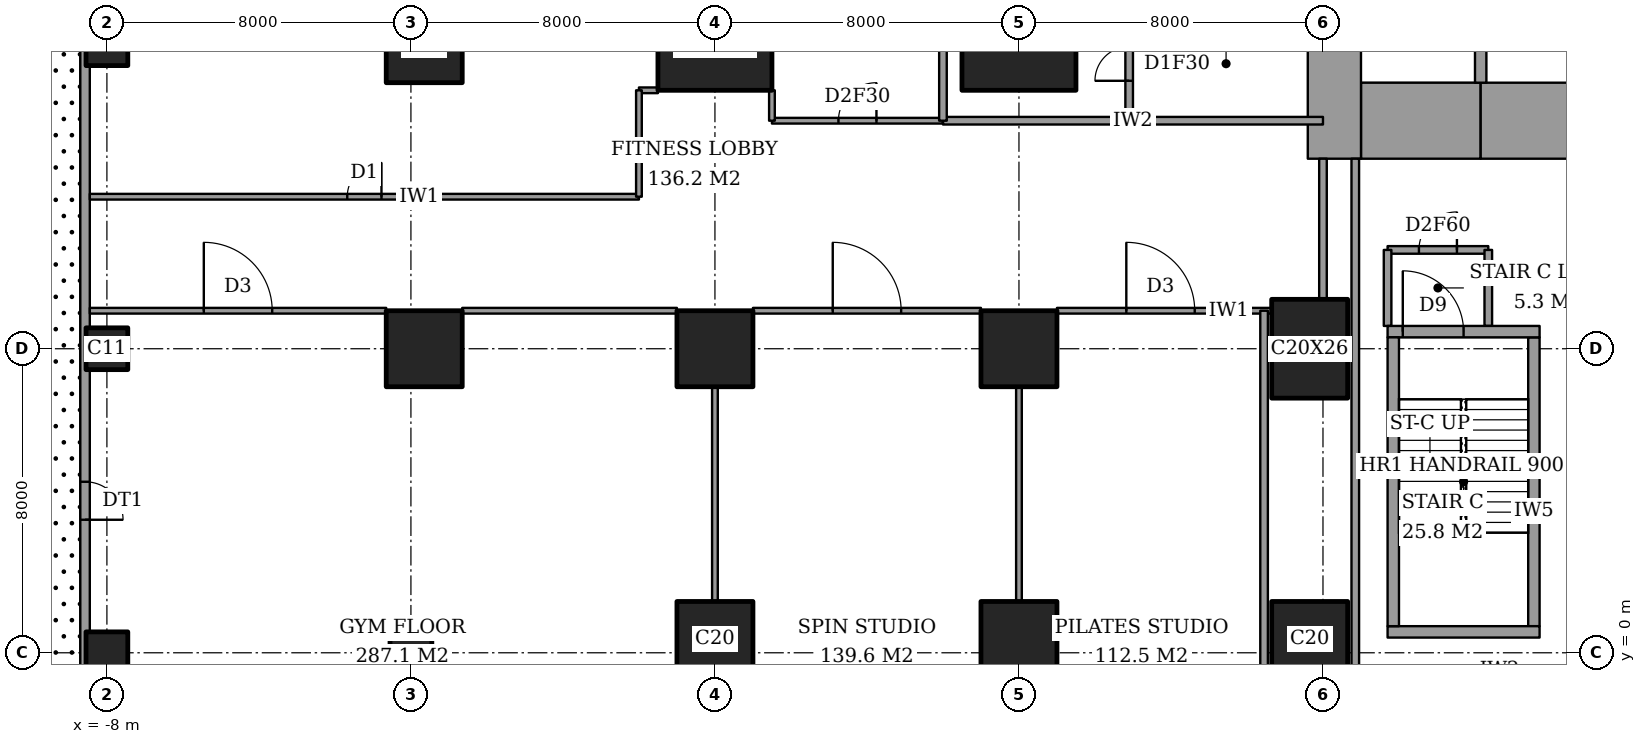
"""IFC4 building model, lengths in metres.
Left out: names, types, materials, properties, quantities, classifications, styles, units other than length and angle.
Written with IfcOpenShell. Run it as: python <this file> out.ifc"""

import sys

from ifc_helpers import new_model, si_unit, direction, frame, frame_2d, origin, origin_2d, place, context, subcontext, project, spatial, rectangle, extrude, element, fill, save


model = new_model("IFC4")
c1 = context("Model", 3, precision=1e-05, world=origin(), true_north=direction((0.0, 1.0)))
c2 = subcontext(c1, "Body", "Model", "MODEL_VIEW")
j1 = project(units=[si_unit("LENGTHUNIT", "METRE"), si_unit("PLANEANGLEUNIT", "RADIAN")], contexts=[c1])
p1 = place(None, origin())
s1 = spatial("IfcSite", under=j1, at=p1, CompositionType="ELEMENT")
p2 = place(p1, origin())
s2 = spatial("IfcBuilding", under=s1, at=p2, CompositionType="ELEMENT")
p3 = place(p2, frame((0.0, 0.0, 11.0)))
s3 = spatial("IfcBuildingStorey", under=s2, at=p3, CompositionType="ELEMENT", Elevation=11.0)
for number, where, z_axis, x_axis in (
    (1, (-8.0, 0.0, 0.0), (0.0, 0.0, 1.0), (1.0, 0.0, 0.0)),
    (2, (-8.0, 8.0, 0.0), (0.0, 0.0, 1.0), (1.0, 0.0, 0.0)),
    (3, (-8.0, 16.0, 0.0), (0.0, 0.0, 1.0), (1.0, 0.0, 0.0)),
    (4, (0.0, 0.0, 0.0), (0.0, 0.0, 1.0), (1.0, 0.0, 0.0)),
):
    element("IfcColumn", number, at=place(p3, frame(where, z_axis=z_axis, x_axis=x_axis)), inside=s3, PredefinedType="COLUMN", context=c2, shape_type="SweptSolid", body=[
        extrude(rectangle(XDim=1.1, YDim=1.1, at=origin_2d()), origin(), (0.0, 0.0, 1.0), 5.0),
    ])
for number, where, z_axis, x_axis in (
    (5, (0.35, 8.0, 0.0), (0.0, 0.0, 1.0), (1.0, 0.0, 0.0)),
    (6, (0.35, 16.0, 0.0), (0.0, 0.0, 1.0), (1.0, 0.0, 0.0)),
    (7, (8.0, 0.35, 0.0), (0.0, 0.0, 1.0), (1.0, 0.0, 0.0)),
    (8, (8.0, 8.0, 0.0), (0.0, 0.0, 1.0), (1.0, 0.0, 0.0)),
):
    element("IfcColumn", number, at=place(p3, frame(where, z_axis=z_axis, x_axis=x_axis)), inside=s3, PredefinedType="COLUMN", context=c2, shape_type="SweptSolid", body=[
        extrude(rectangle(XDim=2.0, YDim=2.0, at=origin_2d()), origin(), (0.0, 0.0, 1.0), 5.0),
    ])
p4 = place(p3, frame((8.0, 16.0, 0.0), z_axis=(0.0, 0.0, 1.0), x_axis=(1.0, 0.0, 0.0)))
e9 = element("IfcColumn", 9, at=p4, inside=s3, PredefinedType="COLUMN", context=c2, shape_type="SweptSolid", body=[
    extrude(rectangle(XDim=3.0, YDim=2.4, at=origin_2d()), origin(), (0.0, 0.0, 1.0), 5.0),
])
for number, where, z_axis, x_axis in (
    (10, (16.0, 0.35, 0.0), (0.0, 0.0, 1.0), (1.0, 0.0, 0.0)),
    (11, (16.0, 8.0, 0.0), (0.0, 0.0, 1.0), (1.0, 0.0, 0.0)),
):
    element("IfcColumn", number, at=place(p3, frame(where, z_axis=z_axis, x_axis=x_axis)), inside=s3, PredefinedType="COLUMN", context=c2, shape_type="SweptSolid", body=[
        extrude(rectangle(XDim=2.0, YDim=2.0, at=origin_2d()), origin(), (0.0, 0.0, 1.0), 5.0),
    ])
p5 = place(p3, frame((16.0, 16.0, 0.0), z_axis=(0.0, 0.0, 1.0), x_axis=(1.0, 0.0, 0.0)))
e12 = element("IfcColumn", 12, at=p5, inside=s3, PredefinedType="COLUMN", context=c2, shape_type="SweptSolid", body=[
    extrude(rectangle(XDim=3.0, YDim=2.4, at=origin_2d()), origin(), (0.0, 0.0, 1.0), 5.0),
])
p6 = place(p3, frame((23.65, 0.35, 0.0), z_axis=(0.0, 0.0, 1.0), x_axis=(1.0, 0.0, 0.0)))
e13 = element("IfcColumn", 13, at=p6, inside=s3, PredefinedType="COLUMN", context=c2, shape_type="SweptSolid", body=[
    extrude(rectangle(XDim=2.0, YDim=2.0, at=origin_2d()), origin(), (0.0, 0.0, 1.0), 5.0),
])
p7 = place(p3, frame((23.65, 8.0, 0.0), z_axis=(0.0, 0.0, 1.0), x_axis=(1.0, 0.0, 0.0)))
e14 = element("IfcColumn", 14, at=p7, inside=s3, PredefinedType="COLUMN", context=c2, shape_type="SweptSolid", body=[
    extrude(rectangle(XDim=2.0, YDim=2.6, at=origin_2d()), origin(), (0.0, 0.0, 1.0), 5.0),
])
p8 = place(p3, frame((25.0, 14.0, 0.0), z_axis=(0.0, 0.0, 1.0), x_axis=(1.0, 0.0, 0.0)))
e15 = element("IfcWall", 15, at=p8, inside=s3, PredefinedType="SHEAR", context=c2, shape_type="SweptSolid", body=[
    extrude(rectangle(XDim=3.15, YDim=2.0, at=frame_2d((1.575, 0.0))), origin(), (0.0, 0.0, 1.0), 5.0),
])
p9 = place(p3, frame((28.15, 14.0, 0.0), z_axis=(0.0, 0.0, 1.0), x_axis=(1.0, 0.0, 0.0)))
e16 = element("IfcWall", 16, at=p9, inside=s3, PredefinedType="SHEAR", context=c2, shape_type="SweptSolid", body=[
    extrude(rectangle(XDim=9.7, YDim=2.0, at=frame_2d((4.85, 0.0))), origin(), (0.0, 0.0, 1.0), 5.0),
])
p10 = place(p3, frame((24.3, 13.0, 0.0), z_axis=(0.0, 0.0, 1.0), x_axis=(0.0, 1.0, 0.0)))
e17 = element("IfcWall", 17, at=p10, inside=s3, PredefinedType="SHEAR", context=c2, shape_type="SweptSolid", body=[
    extrude(rectangle(XDim=10.15, YDim=1.4, at=frame_2d((5.075, 0.0))), origin(), (0.0, 0.0, 1.0), 5.0),
])
p11 = place(p3, frame((28.15, 15.0, 0.0), z_axis=(0.0, 0.0, 1.0), x_axis=(0.0, 1.0, 0.0)))
e18 = element("IfcWall", 18, at=p11, inside=s3, PredefinedType="SHEAR", context=c2, shape_type="SweptSolid", body=[
    extrude(rectangle(XDim=8.15, YDim=0.3, at=frame_2d((4.075, 0.0))), origin(), (0.0, 0.0, 1.0), 5.0),
])
p12 = place(p3, frame((-8.575, 56.575, 0.0), z_axis=(0.0, 0.0, 1.0), x_axis=(0.0, -1.0, 0.0)))
e19 = element("IfcWall", 19, at=p12, inside=s3, PredefinedType="SOLIDWALL", context=c2, shape_type="SweptSolid", body=[
    extrude(rectangle(XDim=65.15, YDim=0.25, at=frame_2d((32.575, 0.0))), origin(), (0.0, 0.0, 1.0), 5.0),
])
p13 = place(p12, frame((4.075, 0.0, 0.0)))
e20 = element("IfcOpeningElement", 20, at=p13, cuts=e19, PredefinedType="OPENING", context=c2, shape_type="SweptSolid", body=[
    extrude(rectangle(XDim=1.0, YDim=2.4, at=frame_2d((0.5, 1.2))), frame((0.0, 0.135, 0.0), z_axis=(0.0, -1.0, 0.0), x_axis=(1.0, 0.0, 0.0)), (0.0, 0.0, 1.0), 0.27),
])
p14 = place(p12, frame((20.075, 0.0, 0.0)))
e21 = element("IfcOpeningElement", 21, at=p14, cuts=e19, PredefinedType="OPENING", context=c2, shape_type="SweptSolid", body=[
    extrude(rectangle(XDim=1.0, YDim=2.4, at=frame_2d((0.5, 1.2))), frame((0.0, 0.135, 0.0), z_axis=(0.0, -1.0, 0.0), x_axis=(1.0, 0.0, 0.0)), (0.0, 0.0, 1.0), 0.27),
])
p15 = place(p12, frame((52.075, 0.0, 0.0)))
e22 = element("IfcOpeningElement", 22, at=p15, cuts=e19, PredefinedType="OPENING", context=c2, shape_type="SweptSolid", body=[
    extrude(rectangle(XDim=1.0, YDim=2.4, at=frame_2d((0.5, 1.2))), frame((0.0, 0.135, 0.0), z_axis=(0.0, -1.0, 0.0), x_axis=(1.0, 0.0, 0.0)), (0.0, 0.0, 1.0), 0.27),
])
p16 = place(p3, frame((-8.45, 9.0, 0.0), z_axis=(0.0, 0.0, 1.0), x_axis=(1.0, 0.0, 0.0)))
e23 = element("IfcWall", 23, at=p16, inside=s3, PredefinedType="PARTITIONING", context=c2, shape_type="SweptSolid", body=[
    extrude(rectangle(XDim=7.8, YDim=0.15, at=frame_2d((3.9, 0.0))), origin(), (0.0, 0.0, 1.0), 4.7),
])
p17 = place(p16, frame((3.0, 0.0, 0.0)))
e24 = element("IfcOpeningElement", 24, at=p17, cuts=e23, PredefinedType="OPENING", context=c2, shape_type="SweptSolid", body=[
    extrude(rectangle(XDim=1.8, YDim=2.1, at=frame_2d((0.9, 1.05))), frame((0.0, 0.085, 0.0), z_axis=(0.0, -1.0, 0.0), x_axis=(1.0, 0.0, 0.0)), (0.0, 0.0, 1.0), 0.17),
])
p18 = place(p3, frame((1.35, 9.0, 0.0), z_axis=(0.0, 0.0, 1.0), x_axis=(1.0, 0.0, 0.0)))
e25 = element("IfcWall", 25, at=p18, inside=s3, PredefinedType="PARTITIONING", context=c2, shape_type="SweptSolid", body=[
    extrude(rectangle(XDim=5.65, YDim=0.15, at=frame_2d((2.825, 0.0))), origin(), (0.0, 0.0, 1.0), 4.7),
])
p19 = place(p3, frame((9.0, 9.0, 0.0), z_axis=(0.0, 0.0, 1.0), x_axis=(1.0, 0.0, 0.0)))
e26 = element("IfcWall", 26, at=p19, inside=s3, PredefinedType="PARTITIONING", context=c2, shape_type="SweptSolid", body=[
    extrude(rectangle(XDim=6.0, YDim=0.15, at=frame_2d((3.0, 0.0))), origin(), (0.0, 0.0, 1.0), 4.7),
])
p20 = place(p19, frame((2.1, 0.0, 0.0)))
e27 = element("IfcOpeningElement", 27, at=p20, cuts=e26, PredefinedType="OPENING", context=c2, shape_type="SweptSolid", body=[
    extrude(rectangle(XDim=1.8, YDim=2.1, at=frame_2d((0.9, 1.05))), frame((0.0, 0.085, 0.0), z_axis=(0.0, -1.0, 0.0), x_axis=(1.0, 0.0, 0.0)), (0.0, 0.0, 1.0), 0.17),
])
p21 = place(p3, frame((17.0, 9.0, 0.0), z_axis=(0.0, 0.0, 1.0), x_axis=(1.0, 0.0, 0.0)))
e28 = element("IfcWall", 28, at=p21, inside=s3, PredefinedType="PARTITIONING", context=c2, shape_type="SweptSolid", body=[
    extrude(rectangle(XDim=5.65, YDim=0.15, at=frame_2d((2.825, 0.0))), origin(), (0.0, 0.0, 1.0), 4.7),
])
p22 = place(p21, frame((1.825, 0.0, 0.0)))
e29 = element("IfcOpeningElement", 29, at=p22, cuts=e28, PredefinedType="OPENING", context=c2, shape_type="SweptSolid", body=[
    extrude(rectangle(XDim=1.8, YDim=2.1, at=frame_2d((0.9, 1.05))), frame((0.0, 0.085, 0.0), z_axis=(0.0, -1.0, 0.0), x_axis=(1.0, 0.0, 0.0)), (0.0, 0.0, 1.0), 0.17),
])
p23 = place(p3, frame((25.7, 10.6, 0.0), z_axis=(0.0, 0.0, 1.0), x_axis=(1.0, 0.0, 0.0)))
e30 = element("IfcWall", 30, at=p23, inside=s3, PredefinedType="PARTITIONING", context=c2, shape_type="SweptSolid", body=[
    extrude(rectangle(XDim=2.65, YDim=0.2, at=frame_2d((1.325, 0.0))), origin(), (0.0, 0.0, 1.0), 4.7),
])
p24 = place(p23, frame((0.825, 0.0, 0.0)))
e31 = element("IfcOpeningElement", 31, at=p24, cuts=e30, PredefinedType="OPENING", context=c2, shape_type="SweptSolid", body=[
    extrude(rectangle(XDim=1.0, YDim=2.1, at=frame_2d((0.5, 1.05))), frame((0.0, 0.11, 0.0), z_axis=(0.0, -1.0, 0.0), x_axis=(1.0, 0.0, 0.0)), (0.0, 0.0, 1.0), 0.22),
])
p25 = place(p3, frame((-8.45, 12.0, 0.0), z_axis=(0.0, 0.0, 1.0), x_axis=(1.0, 0.0, 0.0)))
e32 = element("IfcWall", 32, at=p25, inside=s3, PredefinedType="PARTITIONING", context=c2, shape_type="SweptSolid", body=[
    extrude(rectangle(XDim=14.45, YDim=0.15, at=frame_2d((7.225, 0.0))), origin(), (0.0, 0.0, 1.0), 4.7),
])
p26 = place(p25, frame((6.775, 0.0, 0.0)))
e33 = element("IfcOpeningElement", 33, at=p26, cuts=e32, PredefinedType="OPENING", context=c2, shape_type="SweptSolid", body=[
    extrude(rectangle(XDim=0.9, YDim=2.1, at=frame_2d((0.45, 1.05))), frame((0.0, 0.085, 0.0), z_axis=(0.0, -1.0, 0.0), x_axis=(1.0, 0.0, 0.0)), (0.0, 0.0, 1.0), 0.17),
])
p27 = place(p3, frame((14.0, 14.0, 0.0), z_axis=(0.0, 0.0, 1.0), x_axis=(1.0, 0.0, 0.0)))
e34 = element("IfcWall", 34, at=p27, inside=s3, PredefinedType="PARTITIONING", context=c2, shape_type="SweptSolid", body=[
    extrude(rectangle(XDim=10.0, YDim=0.2, at=frame_2d((5.0, 0.0))), origin(), (0.0, 0.0, 1.0), 4.7),
])
p28 = place(p3, frame((9.5, 14.0, 0.0), z_axis=(0.0, 0.0, 1.0), x_axis=(1.0, 0.0, 0.0)))
e35 = element("IfcWall", 35, at=p28, inside=s3, PredefinedType="PARTITIONING", context=c2, shape_type="SweptSolid", body=[
    extrude(rectangle(XDim=4.5, YDim=0.15, at=frame_2d((2.25, 0.0))), origin(), (0.0, 0.0, 1.0), 4.7),
])
p29 = place(p28, frame((1.75, 0.0, 0.0)))
e36 = element("IfcOpeningElement", 36, at=p29, cuts=e35, PredefinedType="OPENING", context=c2, shape_type="SweptSolid", body=[
    extrude(rectangle(XDim=1.0, YDim=2.1, at=frame_2d((0.5, 1.05))), frame((0.0, 0.085, 0.0), z_axis=(0.0, -1.0, 0.0), x_axis=(1.0, 0.0, 0.0)), (0.0, 0.0, 1.0), 0.17),
])
p30 = place(p3, frame((6.0, 14.8, 0.0), z_axis=(0.0, 0.0, 1.0), x_axis=(1.0, 0.0, 0.0)))
e37 = element("IfcWall", 37, at=p30, inside=s3, PredefinedType="PARTITIONING", context=c2, shape_type="SweptSolid", body=[
    extrude(rectangle(XDim=0.5, YDim=0.15, at=frame_2d((0.25, 0.0))), origin(), (0.0, 0.0, 1.0), 4.7),
])
p31 = place(p3, frame((6.0, 12.0, 0.0), z_axis=(0.0, 0.0, 1.0), x_axis=(0.0, 1.0, 0.0)))
e38 = element("IfcWall", 38, at=p31, inside=s3, PredefinedType="PARTITIONING", context=c2, shape_type="SweptSolid", body=[
    extrude(rectangle(XDim=2.8, YDim=0.15, at=frame_2d((1.4, 0.0))), origin(), (0.0, 0.0, 1.0), 4.7),
])
p32 = place(p3, frame((8.0, 1.35, 0.0), z_axis=(0.0, 0.0, 1.0), x_axis=(0.0, 1.0, 0.0)))
e39 = element("IfcWall", 39, at=p32, inside=s3, PredefinedType="PARTITIONING", context=c2, shape_type="SweptSolid", body=[
    extrude(rectangle(XDim=5.65, YDim=0.15, at=frame_2d((2.825, 0.0))), origin(), (0.0, 0.0, 1.0), 3.3),
])
p33 = place(p3, frame((9.5, 14.0, 0.0), z_axis=(0.0, 0.0, 1.0), x_axis=(0.0, 1.0, 0.0)))
e40 = element("IfcWall", 40, at=p33, inside=s3, PredefinedType="PARTITIONING", context=c2, shape_type="SweptSolid", body=[
    extrude(rectangle(XDim=0.8, YDim=0.15, at=frame_2d((0.4, 0.0))), origin(), (0.0, 0.0, 1.0), 4.7),
])
p34 = place(p3, frame((14.0, 14.0, 0.0), z_axis=(0.0, 0.0, 1.0), x_axis=(0.0, 1.0, 0.0)))
e41 = element("IfcWall", 41, at=p34, inside=s3, PredefinedType="PARTITIONING", context=c2, shape_type="SweptSolid", body=[
    extrude(rectangle(XDim=9.0, YDim=0.2, at=frame_2d((4.5, 0.0))), origin(), (0.0, 0.0, 1.0), 4.7),
])
p35 = place(p34, frame((4.0, 0.0, 0.0)))
e42 = element("IfcOpeningElement", 42, at=p35, cuts=e41, PredefinedType="OPENING", context=c2, shape_type="SweptSolid", body=[
    extrude(rectangle(XDim=1.0, YDim=2.1, at=frame_2d((0.5, 1.05))), frame((0.0, 0.11, 0.0), z_axis=(0.0, -1.0, 0.0), x_axis=(1.0, 0.0, 0.0)), (0.0, 0.0, 1.0), 0.22),
])
p36 = place(p3, frame((16.0, 1.35, 0.0), z_axis=(0.0, 0.0, 1.0), x_axis=(0.0, 1.0, 0.0)))
e43 = element("IfcWall", 43, at=p36, inside=s3, PredefinedType="PARTITIONING", context=c2, shape_type="SweptSolid", body=[
    extrude(rectangle(XDim=5.65, YDim=0.15, at=frame_2d((2.825, 0.0))), origin(), (0.0, 0.0, 1.0), 3.3),
])
p37 = place(p3, frame((18.9, 14.0, 0.0), z_axis=(0.0, 0.0, 1.0), x_axis=(0.0, 1.0, 0.0)))
e44 = element("IfcWall", 44, at=p37, inside=s3, PredefinedType="PARTITIONING", context=c2, shape_type="SweptSolid", body=[
    extrude(rectangle(XDim=6.0, YDim=0.2, at=frame_2d((3.0, 0.0))), origin(), (0.0, 0.0, 1.0), 4.7),
])
p38 = place(p37, frame((1.05, 0.0, 0.0)))
e45 = element("IfcOpeningElement", 45, at=p38, cuts=e44, PredefinedType="OPENING", context=c2, shape_type="SweptSolid", body=[
    extrude(rectangle(XDim=0.9, YDim=2.1, at=frame_2d((0.45, 1.05))), frame((0.0, 0.11, 0.0), z_axis=(0.0, -1.0, 0.0), x_axis=(1.0, 0.0, 0.0)), (0.0, 0.0, 1.0), 0.22),
])
p39 = place(p37, frame((4.05, 0.0, 0.0)))
e46 = element("IfcOpeningElement", 46, at=p39, cuts=e44, PredefinedType="OPENING", context=c2, shape_type="SweptSolid", body=[
    extrude(rectangle(XDim=0.9, YDim=2.1, at=frame_2d((0.45, 1.05))), frame((0.0, 0.11, 0.0), z_axis=(0.0, -1.0, 0.0), x_axis=(1.0, 0.0, 0.0)), (0.0, 0.0, 1.0), 0.22),
])
p40 = place(p3, frame((22.45, -8.45, 0.0), z_axis=(0.0, 0.0, 1.0), x_axis=(0.0, 1.0, 0.0)))
e47 = element("IfcWall", 47, at=p40, inside=s3, PredefinedType="PARTITIONING", context=c2, shape_type="SweptSolid", body=[
    extrude(rectangle(XDim=17.45, YDim=0.2, at=frame_2d((8.725, 0.0))), origin(), (0.0, 0.0, 1.0), 4.7),
])
p41 = place(p3, frame((24.0, 9.3, 0.0), z_axis=(0.0, 0.0, 1.0), x_axis=(0.0, 1.0, 0.0)))
e48 = element("IfcWall", 48, at=p41, inside=s3, PredefinedType="PARTITIONING", context=c2, shape_type="SweptSolid", body=[
    extrude(rectangle(XDim=3.7, YDim=0.2, at=frame_2d((1.85, 0.0))), origin(), (0.0, 0.0, 1.0), 4.7),
])
p42 = place(p3, frame((24.85, -0.45, 0.0), z_axis=(0.0, 0.0, 1.0), x_axis=(0.0, 1.0, 0.0)))
e49 = element("IfcWall", 49, at=p42, inside=s3, PredefinedType="PARTITIONING", context=c2, shape_type="SweptSolid", body=[
    extrude(rectangle(XDim=13.45, YDim=0.2, at=frame_2d((6.725, 0.0))), origin(), (0.0, 0.0, 1.0), 4.7),
])
for number, where, z_axis, x_axis in (
    (50, (25.7, 8.6, 0.0), (0.0, 0.0, 1.0), (0.0, 1.0, 0.0)),
    (51, (28.35, 8.6, 0.0), (0.0, 0.0, 1.0), (0.0, 1.0, 0.0)),
):
    element("IfcWall", number, at=place(p3, frame(where, z_axis=z_axis, x_axis=x_axis)), inside=s3, PredefinedType="PARTITIONING", context=c2, shape_type="SweptSolid", body=[
        extrude(rectangle(XDim=2.0, YDim=0.2, at=frame_2d((1.0, 0.0))), origin(), (0.0, 0.0, 1.0), 4.7),
    ])
p43 = place(p3, frame((25.7, 0.55, 0.0), z_axis=(0.0, 0.0, 1.0), x_axis=(1.0, 0.0, 0.0)))
e52 = element("IfcWall", 52, at=p43, inside=s3, PredefinedType="PARTITIONING", context=c2, shape_type="SweptSolid", body=[
    extrude(rectangle(XDim=4.0, YDim=0.3, at=frame_2d((2.0, 0.0))), origin(), (0.0, 0.0, 1.0), 5.0),
])
p44 = place(p3, frame((25.7, 8.45, 0.0), z_axis=(0.0, 0.0, 1.0), x_axis=(1.0, 0.0, 0.0)))
e53 = element("IfcWall", 53, at=p44, inside=s3, PredefinedType="PARTITIONING", context=c2, shape_type="SweptSolid", body=[
    extrude(rectangle(XDim=4.0, YDim=0.3, at=frame_2d((2.0, 0.0))), origin(), (0.0, 0.0, 1.0), 5.0),
])
p45 = place(p44, frame((0.4, 0.0, 0.0)))
e54 = element("IfcOpeningElement", 54, at=p45, cuts=e53, PredefinedType="OPENING", context=c2, shape_type="SweptSolid", body=[
    extrude(rectangle(XDim=1.6, YDim=2.1, at=frame_2d((0.8, 1.05))), frame((0.0, 0.16, 0.0), z_axis=(0.0, -1.0, 0.0), x_axis=(1.0, 0.0, 0.0)), (0.0, 0.0, 1.0), 0.32),
])
for number, where, z_axis, x_axis in (
    (55, (25.85, 0.7, 0.0), (0.0, 0.0, 1.0), (0.0, 1.0, 0.0)),
    (56, (29.55, 0.7, 0.0), (0.0, 0.0, 1.0), (0.0, 1.0, 0.0)),
):
    element("IfcWall", number, at=place(p3, frame(where, z_axis=z_axis, x_axis=x_axis)), inside=s3, PredefinedType="PARTITIONING", context=c2, shape_type="SweptSolid", body=[
        extrude(rectangle(XDim=7.6, YDim=0.3, at=frame_2d((3.8, 0.0))), origin(), (0.0, 0.0, 1.0), 5.0),
    ])
p46 = place(p15, origin())
e57 = element("IfcDoor", 57, at=p46, inside=s3, OperationType="SINGLE_SWING_LEFT", PredefinedType="DOOR", context=c2, shape_type="SweptSolid", body=[
    extrude(rectangle(XDim=1.0, YDim=2.4, at=frame_2d((0.5, 1.2))), frame((0.0, 0.025, 0.0), z_axis=(0.0, -1.0, 0.0), x_axis=(1.0, 0.0, 0.0)), (0.0, 0.0, 1.0), 0.05),
])
fill(e22, e57)
p47 = place(p26, origin())
e58 = element("IfcDoor", 58, at=p47, inside=s3, OperationType="SINGLE_SWING_LEFT", PredefinedType="DOOR", context=c2, shape_type="SweptSolid", body=[
    extrude(rectangle(XDim=0.9, YDim=2.1, at=frame_2d((0.45, 1.05))), frame((0.0, 0.025, 0.0), z_axis=(0.0, -1.0, 0.0), x_axis=(1.0, 0.0, 0.0)), (0.0, 0.0, 1.0), 0.05),
])
fill(e33, e58)
p48 = place(p29, origin())
e59 = element("IfcDoor", 59, at=p48, inside=s3, OperationType="SINGLE_SWING_LEFT", PredefinedType="DOOR", context=c2, shape_type="SweptSolid", body=[
    extrude(rectangle(XDim=1.0, YDim=2.1, at=frame_2d((0.5, 1.05))), frame((0.0, 0.025, 0.0), z_axis=(0.0, -1.0, 0.0), x_axis=(1.0, 0.0, 0.0)), (0.0, 0.0, 1.0), 0.05),
])
fill(e36, e59)
p49 = place(p17, origin())
e60 = element("IfcDoor", 60, at=p49, inside=s3, OperationType="DOUBLE_DOOR_DOUBLE_SWING", PredefinedType="DOOR", context=c2, shape_type="SweptSolid", body=[
    extrude(rectangle(XDim=1.8, YDim=2.1, at=frame_2d((0.9, 1.05))), frame((0.0, 0.025, 0.0), z_axis=(0.0, -1.0, 0.0), x_axis=(1.0, 0.0, 0.0)), (0.0, 0.0, 1.0), 0.05),
])
fill(e24, e60)
p50 = place(p20, origin())
e61 = element("IfcDoor", 61, at=p50, inside=s3, OperationType="DOUBLE_DOOR_DOUBLE_SWING", PredefinedType="DOOR", context=c2, shape_type="SweptSolid", body=[
    extrude(rectangle(XDim=1.8, YDim=2.1, at=frame_2d((0.9, 1.05))), frame((0.0, 0.025, 0.0), z_axis=(0.0, -1.0, 0.0), x_axis=(1.0, 0.0, 0.0)), (0.0, 0.0, 1.0), 0.05),
])
fill(e27, e61)
p51 = place(p22, origin())
e62 = element("IfcDoor", 62, at=p51, inside=s3, OperationType="DOUBLE_DOOR_DOUBLE_SWING", PredefinedType="DOOR", context=c2, shape_type="SweptSolid", body=[
    extrude(rectangle(XDim=1.8, YDim=2.1, at=frame_2d((0.9, 1.05))), frame((0.0, 0.025, 0.0), z_axis=(0.0, -1.0, 0.0), x_axis=(1.0, 0.0, 0.0)), (0.0, 0.0, 1.0), 0.05),
])
fill(e29, e62)
p52 = place(p38, origin())
e63 = element("IfcDoor", 63, at=p52, inside=s3, OperationType="SINGLE_SWING_RIGHT", PredefinedType="DOOR", context=c2, shape_type="SweptSolid", body=[
    extrude(rectangle(XDim=0.9, YDim=2.1, at=frame_2d((0.45, 1.05))), frame((0.0, 0.025, 0.0), z_axis=(0.0, -1.0, 0.0), x_axis=(1.0, 0.0, 0.0)), (0.0, 0.0, 1.0), 0.05),
])
fill(e45, e63)
p53 = place(p24, origin())
e64 = element("IfcDoor", 64, at=p53, inside=s3, OperationType="SINGLE_SWING_LEFT", PredefinedType="DOOR", context=c2, shape_type="SweptSolid", body=[
    extrude(rectangle(XDim=1.0, YDim=2.1, at=frame_2d((0.5, 1.05))), frame((0.0, 0.025, 0.0), z_axis=(0.0, -1.0, 0.0), x_axis=(1.0, 0.0, 0.0)), (0.0, 0.0, 1.0), 0.05),
])
fill(e31, e64)
p54 = place(p45, origin())
e65 = element("IfcDoor", 65, at=p54, inside=s3, OperationType="DOUBLE_DOOR_SINGLE_SWING", PredefinedType="DOOR", context=c2, shape_type="SweptSolid", body=[
    extrude(rectangle(XDim=1.6, YDim=2.1, at=frame_2d((0.8, 1.05))), frame((0.0, 0.025, 0.0), z_axis=(0.0, -1.0, 0.0), x_axis=(1.0, 0.0, 0.0)), (0.0, 0.0, 1.0), 0.05),
])
fill(e54, e65)
save(model, sys.argv[1])
